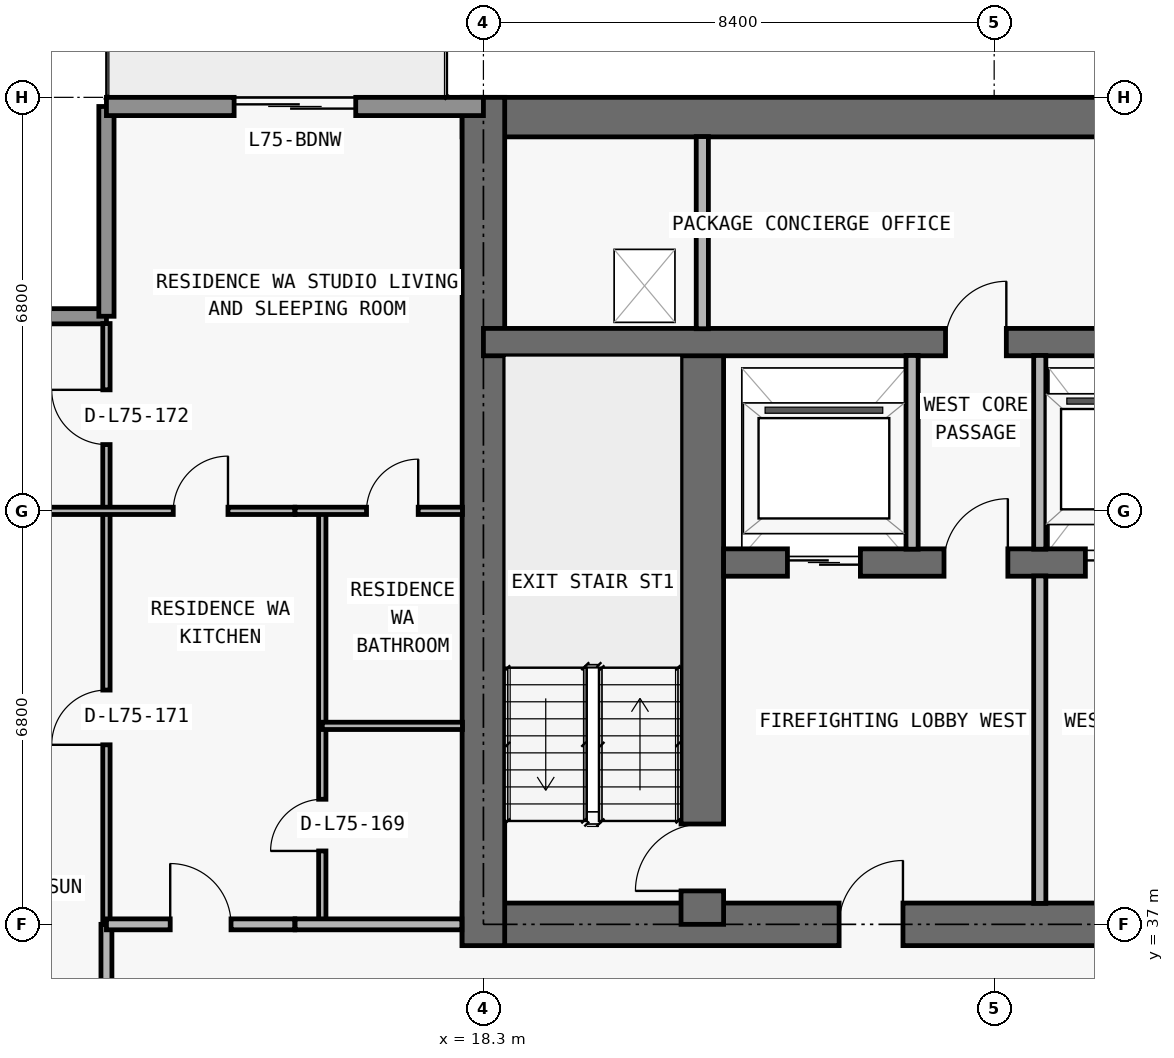
"""IFC4 building model, lengths in metres.
Left out: names, types, materials, properties, quantities, classifications, styles, units other than length and angle.
Written with IfcOpenShell. Run it as: python <this file> out.ifc"""

import sys

from ifc_helpers import new_model, si_unit, direction, frame, frame_2d, origin, place, context, subcontext, project, spatial, rectangle, extrude, element, fill, save


model = new_model("IFC4")
c1 = context("Model", 3, precision=1e-05, world=origin(), true_north=direction((0.0, 1.0)))
c2 = subcontext(c1, "Body", "Model", "MODEL_VIEW")
j1 = project(units=[si_unit("LENGTHUNIT", "METRE"), si_unit("PLANEANGLEUNIT", "RADIAN")], contexts=[c1])
p1 = place(None, origin())
s1 = spatial("IfcSite", under=j1, at=p1, CompositionType="ELEMENT")
p2 = place(p1, origin())
s2 = spatial("IfcBuilding", under=s1, at=p2, CompositionType="ELEMENT")
p3 = place(p2, frame((0.0, 0.0, 266.1)))
s3 = spatial("IfcBuildingStorey", under=s2, at=p3, CompositionType="ELEMENT", Elevation=266.1)
p4 = place(p3, frame((17.95, 37.0, 0.0), z_axis=(0.0, 0.0, 1.0), x_axis=(1.0, 0.0, 0.0)))
e1 = element("IfcWall", 1, at=p4, inside=s3, PredefinedType="SHEAR", context=c2, shape_type="SweptSolid", body=[
    extrude(rectangle(XDim=41.9, YDim=0.7, at=frame_2d((20.95, 0.0))), origin(), (0.0, 0.0, 1.0), 3.0),
])
p5 = place(p4, frame((14.35, 0.0, 0.0)))
e2 = element("IfcOpeningElement", 2, at=p5, cuts=e1, PredefinedType="OPENING", context=c2, shape_type="SweptSolid", body=[
    extrude(rectangle(XDim=1.1, YDim=2.15, at=frame_2d((0.55, 1.075))), frame((0.0, 0.36, 0.0), z_axis=(0.0, -1.0, 0.0), x_axis=(1.0, 0.0, 0.0)), (0.0, 0.0, 1.0), 0.72),
])
p6 = place(p4, frame((6.2, 0.0, 0.0)))
e3 = element("IfcOpeningElement", 3, at=p6, cuts=e1, PredefinedType="OPENING", context=c2, shape_type="SweptSolid", body=[
    extrude(rectangle(XDim=1.05, YDim=2.15, at=frame_2d((0.525, 1.075))), frame((0.0, 0.36, 0.0), z_axis=(0.0, -1.0, 0.0), x_axis=(1.0, 0.0, 0.0)), (0.0, 0.0, 1.0), 0.72),
])
p7 = place(p4, frame((34.7, 0.0, 0.0)))
e4 = element("IfcOpeningElement", 4, at=p7, cuts=e1, PredefinedType="OPENING", context=c2, shape_type="SweptSolid", body=[
    extrude(rectangle(XDim=1.05, YDim=2.15, at=frame_2d((0.525, 1.075))), frame((0.0, 0.36, 0.0), z_axis=(0.0, -1.0, 0.0), x_axis=(1.0, 0.0, 0.0)), (0.0, 0.0, 1.0), 0.72),
])
p8 = place(p4, frame((10.812, 0.0, 0.0)))
e5 = element("IfcOpeningElement", 5, at=p8, cuts=e1, PredefinedType="OPENING", context=c2, shape_type="SweptSolid", body=[
    extrude(rectangle(XDim=1.05, YDim=2.15, at=frame_2d((0.525, 1.075))), frame((0.0, 0.36, 0.0), z_axis=(0.0, -1.0, 0.0), x_axis=(1.0, 0.0, 0.0)), (0.0, 0.0, 1.0), 0.72),
])
p9 = place(p4, frame((24.05, 0.0, 0.0)))
e6 = element("IfcOpeningElement", 6, at=p9, cuts=e1, PredefinedType="OPENING", context=c2, shape_type="SweptSolid", body=[
    extrude(rectangle(XDim=1.05, YDim=2.15, at=frame_2d((0.525, 1.075))), frame((0.0, 0.36, 0.0), z_axis=(0.0, -1.0, 0.0), x_axis=(1.0, 0.0, 0.0)), (0.0, 0.0, 1.0), 0.72),
])
p10 = place(p3, frame((17.95, 50.275, 0.0), z_axis=(0.0, 0.0, 1.0), x_axis=(1.0, 0.0, 0.0)))
e7 = element("IfcWall", 7, at=p10, inside=s3, PredefinedType="SHEAR", context=c2, shape_type="SweptSolid", body=[
    extrude(rectangle(XDim=41.9, YDim=0.65, at=frame_2d((20.95, 0.0))), origin(), (0.0, 0.0, 1.0), 3.0),
])
p11 = place(p3, frame((18.3, 36.65, 0.0), z_axis=(0.0, 0.0, 1.0), x_axis=(0.0, 1.0, 0.0)))
e8 = element("IfcWall", 8, at=p11, inside=s3, PredefinedType="SHEAR", context=c2, shape_type="SweptSolid", body=[
    extrude(rectangle(XDim=13.95, YDim=0.7, at=frame_2d((6.975, 0.0))), origin(), (0.0, 0.0, 1.0), 3.0),
])
p12 = place(p3, frame((21.9, 37.0, 0.0), z_axis=(0.0, 0.0, 1.0), x_axis=(0.0, 1.0, 0.0)))
e9 = element("IfcWall", 9, at=p12, inside=s3, PredefinedType="SHEAR", context=c2, shape_type="SweptSolid", body=[
    extrude(rectangle(XDim=9.575, YDim=0.7, at=frame_2d((4.788, 0.0))), origin(), (0.0, 0.0, 1.0), 3.0),
])
p13 = place(p12, frame((0.55, 0.0, 0.0)))
e10 = element("IfcOpeningElement", 10, at=p13, cuts=e9, PredefinedType="OPENING", context=c2, shape_type="SweptSolid", body=[
    extrude(rectangle(XDim=1.1, YDim=2.15, at=frame_2d((0.55, 1.075))), frame((0.0, 0.36, 0.0), z_axis=(0.0, -1.0, 0.0), x_axis=(1.0, 0.0, 0.0)), (0.0, 0.0, 1.0), 0.72),
])
p14 = place(p3, frame((22.25, 42.95, 0.0), z_axis=(0.0, 0.0, 1.0), x_axis=(1.0, 0.0, 0.0)))
e11 = element("IfcWall", 11, at=p14, inside=s3, PredefinedType="SHEAR", context=c2, shape_type="SweptSolid", body=[
    extrude(rectangle(XDim=33.3, YDim=0.45, at=frame_2d((16.65, 0.0))), origin(), (0.0, 0.0, 1.0), 3.0),
])
p15 = place(p14, frame((1.05, 0.0, 0.0)))
e12 = element("IfcOpeningElement", 12, at=p15, cuts=e11, PredefinedType="OPENING", context=c2, shape_type="SweptSolid", body=[
    extrude(rectangle(XDim=1.2, YDim=2.2, at=frame_2d((0.6, 1.1))), frame((0.0, 0.235, 0.0), z_axis=(0.0, -1.0, 0.0), x_axis=(1.0, 0.0, 0.0)), (0.0, 0.0, 1.0), 0.47),
])
p16 = place(p14, frame((31.05, 0.0, 0.0)))
e13 = element("IfcOpeningElement", 13, at=p16, cuts=e11, PredefinedType="OPENING", context=c2, shape_type="SweptSolid", body=[
    extrude(rectangle(XDim=1.2, YDim=2.2, at=frame_2d((0.6, 1.1))), frame((0.0, 0.235, 0.0), z_axis=(0.0, -1.0, 0.0), x_axis=(1.0, 0.0, 0.0)), (0.0, 0.0, 1.0), 0.47),
])
p17 = place(p14, frame((26.45, 0.0, 0.0)))
e14 = element("IfcOpeningElement", 14, at=p17, cuts=e11, PredefinedType="OPENING", context=c2, shape_type="SweptSolid", body=[
    extrude(rectangle(XDim=1.1, YDim=2.2, at=frame_2d((0.55, 1.1))), frame((0.0, 0.235, 0.0), z_axis=(0.0, -1.0, 0.0), x_axis=(1.0, 0.0, 0.0)), (0.0, 0.0, 1.0), 0.47),
])
p18 = place(p14, frame((5.95, 0.0, 0.0)))
e15 = element("IfcOpeningElement", 15, at=p18, cuts=e11, PredefinedType="OPENING", context=c2, shape_type="SweptSolid", body=[
    extrude(rectangle(XDim=1.1, YDim=2.2, at=frame_2d((0.55, 1.1))), frame((0.0, 0.235, 0.0), z_axis=(0.0, -1.0, 0.0), x_axis=(1.0, 0.0, 0.0)), (0.0, 0.0, 1.0), 0.47),
])
p19 = place(p14, frame((3.625, 0.0, 0.0)))
e16 = element("IfcOpeningElement", 16, at=p19, cuts=e11, PredefinedType="OPENING", context=c2, shape_type="SweptSolid", body=[
    extrude(rectangle(XDim=1.05, YDim=2.15, at=frame_2d((0.525, 1.075))), frame((0.0, 0.235, 0.0), z_axis=(0.0, -1.0, 0.0), x_axis=(1.0, 0.0, 0.0)), (0.0, 0.0, 1.0), 0.47),
])
p20 = place(p14, frame((28.675, 0.0, 0.0)))
e17 = element("IfcOpeningElement", 17, at=p20, cuts=e11, PredefinedType="OPENING", context=c2, shape_type="SweptSolid", body=[
    extrude(rectangle(XDim=1.05, YDim=2.15, at=frame_2d((0.525, 1.075))), frame((0.0, 0.235, 0.0), z_axis=(0.0, -1.0, 0.0), x_axis=(1.0, 0.0, 0.0)), (0.0, 0.0, 1.0), 0.47),
])
p21 = place(p14, frame((14.7, 0.0, 0.0)))
e18 = element("IfcOpeningElement", 18, at=p21, cuts=e11, PredefinedType="OPENING", context=c2, shape_type="SweptSolid", body=[
    extrude(rectangle(XDim=1.0, YDim=2.2, at=frame_2d((0.5, 1.1))), frame((0.0, 0.235, 0.0), z_axis=(0.0, -1.0, 0.0), x_axis=(1.0, 0.0, 0.0)), (0.0, 0.0, 1.0), 0.47),
])
p22 = place(p14, frame((21.45, 0.0, 0.0)))
e19 = element("IfcOpeningElement", 19, at=p22, cuts=e11, PredefinedType="OPENING", context=c2, shape_type="SweptSolid", body=[
    extrude(rectangle(XDim=1.0, YDim=2.2, at=frame_2d((0.5, 1.1))), frame((0.0, 0.235, 0.0), z_axis=(0.0, -1.0, 0.0), x_axis=(1.0, 0.0, 0.0)), (0.0, 0.0, 1.0), 0.47),
])
p23 = place(p3, frame((18.3, 46.575, 0.0), z_axis=(0.0, 0.0, 1.0), x_axis=(1.0, 0.0, 0.0)))
e20 = element("IfcWall", 20, at=p23, inside=s3, PredefinedType="SHEAR", context=c2, shape_type="SweptSolid", body=[
    extrude(rectangle(XDim=41.2, YDim=0.45, at=frame_2d((20.6, 0.0))), origin(), (0.0, 0.0, 1.0), 3.0),
])
p24 = place(p23, frame((7.6, 0.0, 0.0)))
e21 = element("IfcOpeningElement", 21, at=p24, cuts=e20, PredefinedType="OPENING", context=c2, shape_type="SweptSolid", body=[
    extrude(rectangle(XDim=1.0, YDim=2.2, at=frame_2d((0.5, 1.1))), frame((0.0, 0.235, 0.0), z_axis=(0.0, -1.0, 0.0), x_axis=(1.0, 0.0, 0.0)), (0.0, 0.0, 1.0), 0.47),
])
p25 = place(p23, frame((32.625, 0.0, 0.0)))
e22 = element("IfcOpeningElement", 22, at=p25, cuts=e20, PredefinedType="OPENING", context=c2, shape_type="SweptSolid", body=[
    extrude(rectangle(XDim=1.05, YDim=2.15, at=frame_2d((0.525, 1.075))), frame((0.0, 0.235, 0.0), z_axis=(0.0, -1.0, 0.0), x_axis=(1.0, 0.0, 0.0)), (0.0, 0.0, 1.0), 0.47),
])
p26 = place(p3, frame((8.25, 47.0, 0.0), z_axis=(0.0, 0.0, 1.0), x_axis=(1.0, 0.0, 0.0)))
e23 = element("IfcWall", 23, at=p26, inside=s3, PredefinedType="ELEMENTEDWALL", context=c2, shape_type="SweptSolid", body=[
    extrude(rectangle(XDim=3.85, YDim=0.25, at=frame_2d((1.925, 0.0))), origin(), (0.0, 0.0, 1.0), 3.0),
])
p27 = place(p3, frame((12.1, 47.0, 0.0), z_axis=(0.0, 0.0, 1.0), x_axis=(0.0, 1.0, 0.0)))
e24 = element("IfcWall", 24, at=p27, inside=s3, PredefinedType="ELEMENTEDWALL", context=c2, shape_type="SweptSolid", body=[
    extrude(rectangle(XDim=3.45, YDim=0.25, at=frame_2d((1.725, 0.0))), origin(), (0.0, 0.0, 1.0), 3.0),
])
p28 = place(p3, frame((12.1, 50.45, 0.0), z_axis=(0.0, 0.0, 1.0), x_axis=(1.0, 0.0, 0.0)))
e25 = element("IfcWall", 25, at=p28, inside=s3, PredefinedType="STANDARD", context=c2, shape_type="SweptSolid", body=[
    extrude(rectangle(XDim=6.2, YDim=0.3, at=frame_2d((3.1, 0.0))), origin(), (0.0, 0.0, 1.0), 3.0),
])
p29 = place(p28, frame((2.1, 0.0, 0.0)))
e26 = element("IfcOpeningElement", 26, at=p29, cuts=e25, PredefinedType="OPENING", context=c2, shape_type="SweptSolid", body=[
    extrude(rectangle(XDim=2.0, YDim=2.3, at=frame_2d((1.0, 1.15))), frame((0.0, 0.16, 0.0), z_axis=(0.0, -1.0, 0.0), x_axis=(1.0, 0.0, 0.0)), (0.0, 0.0, 1.0), 0.32),
])
p30 = place(p3, frame((12.1, 34.805, 0.0), z_axis=(0.0, 0.0, 1.0), x_axis=(0.0, 1.0, 0.0)))
e27 = element("IfcWall", 27, at=p30, inside=s3, PredefinedType="PARTITIONING", context=c2, shape_type="SweptSolid", body=[
    extrude(rectangle(XDim=2.195, YDim=0.18, at=frame_2d((1.098, 0.0))), origin(), (0.0, 0.0, 1.0), 3.0),
])
p31 = place(p3, frame((12.1, 37.005, 0.0), z_axis=(0.0, 0.0, 1.0), x_axis=(0.0, 1.0, 0.0)))
e28 = element("IfcWall", 28, at=p31, inside=s3, PredefinedType="PARTITIONING", context=c2, shape_type="SweptSolid", body=[
    extrude(rectangle(XDim=9.875, YDim=0.12, at=frame_2d((4.938, 0.0))), origin(), (0.0, 0.0, 1.0), 3.0),
])
p32 = place(p31, frame((2.948, 0.0, 0.0)))
e29 = element("IfcOpeningElement", 29, at=p32, cuts=e28, PredefinedType="OPENING", context=c2, shape_type="SweptSolid", body=[
    extrude(rectangle(XDim=0.9, YDim=2.15, at=frame_2d((0.45, 1.075))), frame((0.0, 0.07, 0.0), z_axis=(0.0, -1.0, 0.0), x_axis=(1.0, 0.0, 0.0)), (0.0, 0.0, 1.0), 0.14),
])
p33 = place(p31, frame((7.885, 0.0, 0.0)))
e30 = element("IfcOpeningElement", 30, at=p33, cuts=e28, PredefinedType="OPENING", context=c2, shape_type="SweptSolid", body=[
    extrude(rectangle(XDim=0.9, YDim=2.15, at=frame_2d((0.45, 1.075))), frame((0.0, 0.07, 0.0), z_axis=(0.0, -1.0, 0.0), x_axis=(1.0, 0.0, 0.0)), (0.0, 0.0, 1.0), 0.14),
])
p34 = place(p3, frame((15.65, 37.0, 0.0), z_axis=(0.0, 0.0, 1.0), x_axis=(0.0, 1.0, 0.0)))
e31 = element("IfcWall", 31, at=p34, inside=s3, PredefinedType="PARTITIONING", context=c2, shape_type="SweptSolid", body=[
    extrude(rectangle(XDim=6.8, YDim=0.12, at=frame_2d((3.4, 0.0))), origin(), (0.0, 0.0, 1.0), 3.0),
])
p35 = place(p34, frame((1.207, 0.0, 0.0)))
e32 = element("IfcOpeningElement", 32, at=p35, cuts=e31, PredefinedType="OPENING", context=c2, shape_type="SweptSolid", body=[
    extrude(rectangle(XDim=0.85, YDim=2.1, at=frame_2d((0.425, 1.05))), frame((0.0, 0.07, 0.0), z_axis=(0.0, -1.0, 0.0), x_axis=(1.0, 0.0, 0.0)), (0.0, 0.0, 1.0), 0.14),
])
p36 = place(p3, frame((21.9, 46.795, 0.0), z_axis=(0.0, 0.0, 1.0), x_axis=(0.0, 1.0, 0.0)))
e33 = element("IfcWall", 33, at=p36, inside=s3, PredefinedType="PARTITIONING", context=c2, shape_type="SweptSolid", body=[
    extrude(rectangle(XDim=3.16, YDim=0.2, at=frame_2d((1.58, 0.0))), origin(), (0.0, 0.0, 1.0), 3.0),
])
p37 = place(p3, frame((25.35, 43.17, 0.0), z_axis=(0.0, 0.0, 1.0), x_axis=(0.0, 1.0, 0.0)))
e34 = element("IfcWall", 34, at=p37, inside=s3, PredefinedType="PARTITIONING", context=c2, shape_type="SweptSolid", body=[
    extrude(rectangle(XDim=3.185, YDim=0.2, at=frame_2d((1.593, 0.0))), origin(), (0.0, 0.0, 1.0), 3.0),
])
p38 = place(p3, frame((27.45, 37.345, 0.0), z_axis=(0.0, 0.0, 1.0), x_axis=(0.0, 1.0, 0.0)))
e35 = element("IfcWall", 35, at=p38, inside=s3, PredefinedType="PARTITIONING", context=c2, shape_type="SweptSolid", body=[
    extrude(rectangle(XDim=5.385, YDim=0.2, at=frame_2d((2.692, 0.0))), origin(), (0.0, 0.0, 1.0), 3.0),
])
p39 = place(p3, frame((27.45, 43.17, 0.0), z_axis=(0.0, 0.0, 1.0), x_axis=(0.0, 1.0, 0.0)))
e36 = element("IfcWall", 36, at=p39, inside=s3, PredefinedType="PARTITIONING", context=c2, shape_type="SweptSolid", body=[
    extrude(rectangle(XDim=3.185, YDim=0.2, at=frame_2d((1.593, 0.0))), origin(), (0.0, 0.0, 1.0), 3.0),
])
p40 = place(p3, frame((12.1, 37.0, 0.0), z_axis=(0.0, 0.0, 1.0), x_axis=(1.0, 0.0, 0.0)))
e37 = element("IfcWall", 37, at=p40, inside=s3, PredefinedType="PARTITIONING", context=c2, shape_type="SweptSolid", body=[
    extrude(rectangle(XDim=3.098, YDim=0.18, at=frame_2d((1.549, 0.0))), origin(), (0.0, 0.0, 1.0), 3.0),
])
p41 = place(p40, frame((1.049, 0.0, 0.0)))
e38 = element("IfcOpeningElement", 38, at=p41, cuts=e37, PredefinedType="OPENING", context=c2, shape_type="SweptSolid", body=[
    extrude(rectangle(XDim=1.0, YDim=2.2, at=frame_2d((0.5, 1.1))), frame((0.0, 0.1, 0.0), z_axis=(0.0, -1.0, 0.0), x_axis=(1.0, 0.0, 0.0)), (0.0, 0.0, 1.0), 0.2),
])
p42 = place(p3, frame((15.203, 37.0, 0.0), z_axis=(0.0, 0.0, 1.0), x_axis=(1.0, 0.0, 0.0)))
e39 = element("IfcWall", 39, at=p42, inside=s3, PredefinedType="PARTITIONING", context=c2, shape_type="SweptSolid", body=[
    extrude(rectangle(XDim=2.742, YDim=0.18, at=frame_2d((1.371, 0.0))), origin(), (0.0, 0.0, 1.0), 3.0),
])
p43 = place(p3, frame((15.65, 40.264, 0.0), z_axis=(0.0, 0.0, 1.0), x_axis=(1.0, 0.0, 0.0)))
e40 = element("IfcWall", 40, at=p43, inside=s3, PredefinedType="PARTITIONING", context=c2, shape_type="SweptSolid", body=[
    extrude(rectangle(XDim=2.305, YDim=0.12, at=frame_2d((1.153, 0.0))), origin(), (0.0, 0.0, 1.0), 3.0),
])
p44 = place(p3, frame((8.395, 43.8, 0.0), z_axis=(0.0, 0.0, 1.0), x_axis=(1.0, 0.0, 0.0)))
e41 = element("IfcWall", 41, at=p44, inside=s3, PredefinedType="PARTITIONING", context=c2, shape_type="SweptSolid", body=[
    extrude(rectangle(XDim=6.803, YDim=0.12, at=frame_2d((3.401, 0.0))), origin(), (0.0, 0.0, 1.0), 2.368),
])
p45 = place(p44, frame((4.804, 0.0, 0.0)))
e42 = element("IfcOpeningElement", 42, at=p45, cuts=e41, PredefinedType="OPENING", context=c2, shape_type="SweptSolid", body=[
    extrude(rectangle(XDim=0.9, YDim=2.15, at=frame_2d((0.45, 1.075))), frame((0.0, 0.07, 0.0), z_axis=(0.0, -1.0, 0.0), x_axis=(1.0, 0.0, 0.0)), (0.0, 0.0, 1.0), 0.14),
])
p46 = place(p3, frame((15.203, 43.8, 0.0), z_axis=(0.0, 0.0, 1.0), x_axis=(1.0, 0.0, 0.0)))
e43 = element("IfcWall", 43, at=p46, inside=s3, PredefinedType="PARTITIONING", context=c2, shape_type="SweptSolid", body=[
    extrude(rectangle(XDim=2.752, YDim=0.12, at=frame_2d((1.376, 0.0))), origin(), (0.0, 0.0, 1.0), 2.368),
])
p47 = place(p46, frame((1.175, 0.0, 0.0)))
e44 = element("IfcOpeningElement", 44, at=p47, cuts=e43, PredefinedType="OPENING", context=c2, shape_type="SweptSolid", body=[
    extrude(rectangle(XDim=0.85, YDim=2.1, at=frame_2d((0.425, 1.05))), frame((0.0, 0.07, 0.0), z_axis=(0.0, -1.0, 0.0), x_axis=(1.0, 0.0, 0.0)), (0.0, 0.0, 1.0), 0.14),
])
p48 = place(p29, origin())
e45 = element("IfcDoor", 45, at=p48, inside=s3, OperationType="DOUBLE_DOOR_SLIDING", PredefinedType="DOOR", context=c2, shape_type="SweptSolid", body=[
    extrude(rectangle(XDim=2.0, YDim=2.3, at=frame_2d((1.0, 1.15))), frame((0.0, 0.025, 0.0), z_axis=(0.0, -1.0, 0.0), x_axis=(1.0, 0.0, 0.0)), (0.0, 0.0, 1.0), 0.05),
])
fill(e26, e45)
p49 = place(p15, origin())
e46 = element("IfcDoor", 46, at=p49, inside=s3, OperationType="DOUBLE_DOOR_SLIDING", PredefinedType="DOOR", context=c2, shape_type="SweptSolid", body=[
    extrude(rectangle(XDim=1.2, YDim=2.2, at=frame_2d((0.6, 1.1))), frame((0.0, 0.025, 0.0), z_axis=(0.0, -1.0, 0.0), x_axis=(1.0, 0.0, 0.0)), (0.0, 0.0, 1.0), 0.05),
])
fill(e12, e46)
p50 = place(p18, origin())
e47 = element("IfcDoor", 47, at=p50, inside=s3, OperationType="DOUBLE_DOOR_SLIDING", PredefinedType="DOOR", context=c2, shape_type="SweptSolid", body=[
    extrude(rectangle(XDim=1.1, YDim=2.2, at=frame_2d((0.55, 1.1))), frame((0.0, 0.025, 0.0), z_axis=(0.0, -1.0, 0.0), x_axis=(1.0, 0.0, 0.0)), (0.0, 0.0, 1.0), 0.05),
])
fill(e15, e47)
p51 = place(p6, origin())
e48 = element("IfcDoor", 48, at=p51, inside=s3, OperationType="SINGLE_SWING_RIGHT", PredefinedType="DOOR", context=c2, shape_type="SweptSolid", body=[
    extrude(rectangle(XDim=1.05, YDim=2.15, at=frame_2d((0.525, 1.075))), frame((0.0, 0.025, 0.0), z_axis=(0.0, -1.0, 0.0), x_axis=(1.0, 0.0, 0.0)), (0.0, 0.0, 1.0), 0.05),
])
fill(e3, e48)
p52 = place(p13, origin())
e49 = element("IfcDoor", 49, at=p52, inside=s3, OperationType="SINGLE_SWING_LEFT", PredefinedType="DOOR", context=c2, shape_type="SweptSolid", body=[
    extrude(rectangle(XDim=1.1, YDim=2.15, at=frame_2d((0.55, 1.075))), frame((0.0, 0.025, 0.0), z_axis=(0.0, -1.0, 0.0), x_axis=(1.0, 0.0, 0.0)), (0.0, 0.0, 1.0), 0.05),
])
fill(e10, e49)
p53 = place(p19, origin())
e50 = element("IfcDoor", 50, at=p53, inside=s3, OperationType="SINGLE_SWING_RIGHT", PredefinedType="DOOR", context=c2, shape_type="SweptSolid", body=[
    extrude(rectangle(XDim=1.05, YDim=2.15, at=frame_2d((0.525, 1.075))), frame((0.0, 0.025, 0.0), z_axis=(0.0, -1.0, 0.0), x_axis=(1.0, 0.0, 0.0)), (0.0, 0.0, 1.0), 0.05),
])
fill(e16, e50)
p54 = place(p24, origin())
e51 = element("IfcDoor", 51, at=p54, inside=s3, OperationType="SINGLE_SWING_RIGHT", PredefinedType="DOOR", context=c2, shape_type="SweptSolid", body=[
    extrude(rectangle(XDim=1.0, YDim=2.2, at=frame_2d((0.5, 1.1))), frame((0.0, 0.025, 0.0), z_axis=(0.0, -1.0, 0.0), x_axis=(1.0, 0.0, 0.0)), (0.0, 0.0, 1.0), 0.05),
])
fill(e21, e51)
p55 = place(p41, origin())
e52 = element("IfcDoor", 52, at=p55, inside=s3, OperationType="SINGLE_SWING_LEFT", PredefinedType="DOOR", context=c2, shape_type="SweptSolid", body=[
    extrude(rectangle(XDim=1.0, YDim=2.2, at=frame_2d((0.5, 1.1))), frame((0.0, 0.025, 0.0), z_axis=(0.0, -1.0, 0.0), x_axis=(1.0, 0.0, 0.0)), (0.0, 0.0, 1.0), 0.05),
])
fill(e38, e52)
p56 = place(p45, origin())
e53 = element("IfcDoor", 53, at=p56, inside=s3, OperationType="SINGLE_SWING_RIGHT", PredefinedType="DOOR", context=c2, shape_type="SweptSolid", body=[
    extrude(rectangle(XDim=0.9, YDim=2.15, at=frame_2d((0.45, 1.075))), frame((0.0, 0.025, 0.0), z_axis=(0.0, -1.0, 0.0), x_axis=(1.0, 0.0, 0.0)), (0.0, 0.0, 1.0), 0.05),
])
fill(e42, e53)
p57 = place(p35, origin())
e54 = element("IfcDoor", 54, at=p57, inside=s3, OperationType="SINGLE_SWING_LEFT", PredefinedType="DOOR", context=c2, shape_type="SweptSolid", body=[
    extrude(rectangle(XDim=0.85, YDim=2.1, at=frame_2d((0.425, 1.05))), frame((0.0, 0.025, 0.0), z_axis=(0.0, -1.0, 0.0), x_axis=(1.0, 0.0, 0.0)), (0.0, 0.0, 1.0), 0.05),
])
fill(e32, e54)
p58 = place(p47, origin())
e55 = element("IfcDoor", 55, at=p58, inside=s3, OperationType="SINGLE_SWING_RIGHT", PredefinedType="DOOR", context=c2, shape_type="SweptSolid", body=[
    extrude(rectangle(XDim=0.85, YDim=2.1, at=frame_2d((0.425, 1.05))), frame((0.0, 0.025, 0.0), z_axis=(0.0, -1.0, 0.0), x_axis=(1.0, 0.0, 0.0)), (0.0, 0.0, 1.0), 0.05),
])
fill(e44, e55)
p59 = place(p32, origin())
e56 = element("IfcDoor", 56, at=p59, inside=s3, OperationType="SINGLE_SWING_LEFT", PredefinedType="DOOR", context=c2, shape_type="SweptSolid", body=[
    extrude(rectangle(XDim=0.9, YDim=2.15, at=frame_2d((0.45, 1.075))), frame((0.0, 0.025, 0.0), z_axis=(0.0, -1.0, 0.0), x_axis=(1.0, 0.0, 0.0)), (0.0, 0.0, 1.0), 0.05),
])
fill(e29, e56)
p60 = place(p33, origin())
e57 = element("IfcDoor", 57, at=p60, inside=s3, OperationType="SINGLE_SWING_RIGHT", PredefinedType="DOOR", context=c2, shape_type="SweptSolid", body=[
    extrude(rectangle(XDim=0.9, YDim=2.15, at=frame_2d((0.45, 1.075))), frame((0.0, 0.025, 0.0), z_axis=(0.0, -1.0, 0.0), x_axis=(1.0, 0.0, 0.0)), (0.0, 0.0, 1.0), 0.05),
])
fill(e30, e57)
save(model, sys.argv[1])
